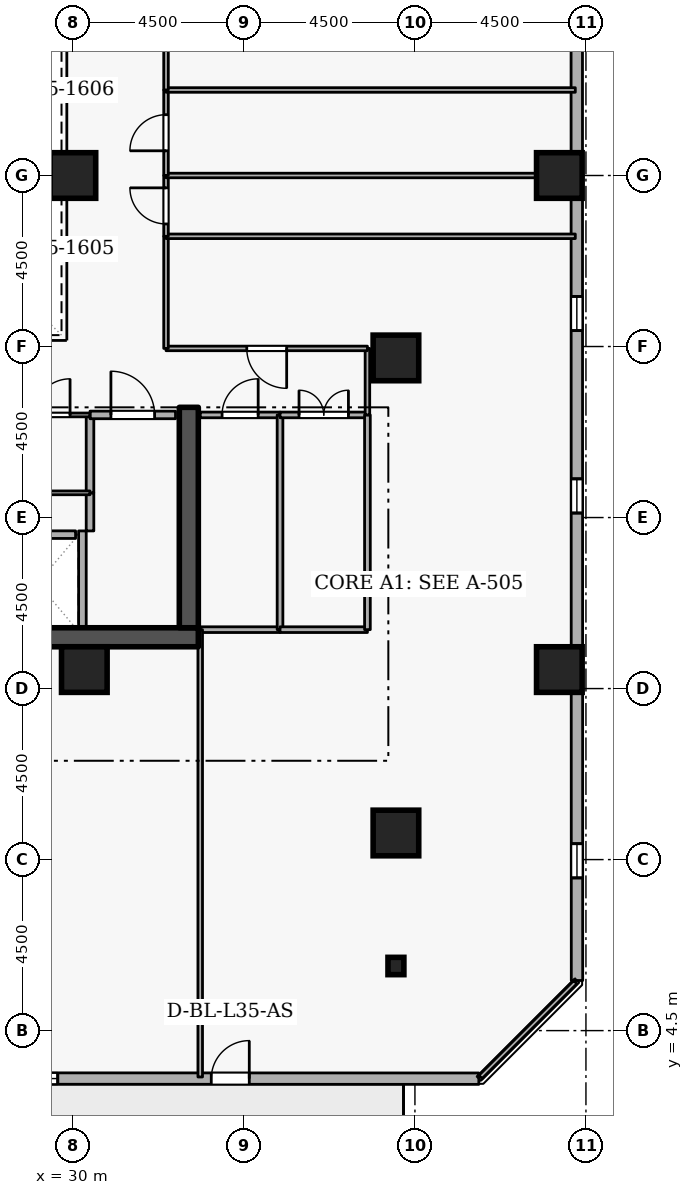
"""IFC4 building model, lengths in metres.
Left out: names, types, materials, properties, quantities, classifications, styles, units other than length and angle.
Written with IfcOpenShell. Run it as: python <this file> out.ifc"""

import sys

from ifc_helpers import new_model, si_unit, direction, frame, frame_2d, origin, origin_2d, place, context, subcontext, project, spatial, rectangle, i_section, extrude, element, fill, save


model = new_model("IFC4")
c1 = context("Model", 3, precision=1e-05, world=origin(), true_north=direction((0.0, 1.0)))
c2 = subcontext(c1, "Body", "Model", "MODEL_VIEW")
j1 = project(units=[si_unit("LENGTHUNIT", "METRE"), si_unit("PLANEANGLEUNIT", "RADIAN")], contexts=[c1])
p1 = place(None, origin())
s1 = spatial("IfcSite", under=j1, at=p1, CompositionType="ELEMENT")
p2 = place(p1, origin())
s2 = spatial("IfcBuilding", under=s1, at=p2, CompositionType="ELEMENT")
p3 = place(p2, frame((0.0, 0.0, 134.1)))
s3 = spatial("IfcBuildingStorey", under=s2, at=p3, CompositionType="ELEMENT", Elevation=134.1)
p4 = place(p3, frame((17.7, 14.85, 0.0), z_axis=(0.0, 0.0, 1.0), x_axis=(1.0, 0.0, 0.0)))
e1 = element("IfcWall", 1, at=p4, inside=s3, PredefinedType="SHEAR", context=c2, shape_type="SweptSolid", body=[
    extrude(rectangle(XDim=15.6, YDim=0.5, at=frame_2d((7.8, 0.0))), origin(), (0.0, 0.0, 1.0), 3.6),
])
p5 = place(p3, frame((33.05, 15.1, 0.0), z_axis=(0.0, 0.0, 1.0), x_axis=(0.0, 1.0, 0.0)))
e2 = element("IfcWall", 2, at=p5, inside=s3, PredefinedType="SHEAR", context=c2, shape_type="SweptSolid", body=[
    extrude(rectangle(XDim=5.8, YDim=0.5, at=frame_2d((2.9, 0.0))), origin(), (0.0, 0.0, 1.0), 3.6),
])
for number, where, z_axis, x_axis in (
    (3, (38.5, 9.7, 0.0), (0.0, 0.0, 1.0), (1.0, 0.0, 0.0)),
    (4, (42.8, 14.0, 0.0), (0.0, 0.0, 1.0), (1.0, 0.0, 0.0)),
    (5, (42.8, 27.0, 0.0), (0.0, 0.0, 1.0), (1.0, 0.0, 0.0)),
    (6, (38.5, 22.2, 0.0), (0.0, 0.0, 1.0), (1.0, 0.0, 0.0)),
    (7, (30.3, 14.0, 0.0), (0.0, 0.0, 1.0), (1.0, 0.0, 0.0)),
    (8, (30.0, 27.0, 0.0), (0.0, 0.0, 1.0), (1.0, 0.0, 0.0)),
):
    element("IfcColumn", number, at=place(p3, frame(where, z_axis=z_axis, x_axis=x_axis)), inside=s3, PredefinedType="COLUMN", context=c2, shape_type="SweptSolid", body=[
        extrude(rectangle(XDim=1.2, YDim=1.2, at=origin_2d()), origin(), (0.0, 0.0, 1.0), 3.6),
    ])
p6 = place(p3, frame((38.5, 6.2, 0.0), z_axis=(0.0, 0.0, 1.0), x_axis=(1.0, 0.0, 0.0)))
e9 = element("IfcColumn", 9, at=p6, inside=s3, PredefinedType="COLUMN", context=c2, shape_type="SweptSolid", body=[
    extrude(i_section(OverallWidth=0.418, OverallDepth=0.456, WebThickness=0.042, FlangeThickness=0.067, FilletRadius=0.015, at=origin_2d()), origin(), (0.0, 0.0, 1.0), 3.6),
])
p7 = place(p3, frame((6.801, 3.244, 0.0), z_axis=(0.0, 0.0, 1.0), x_axis=(0.999999969988, -0.000244999128, 0.0)))
e10 = element("IfcWall", 10, at=p7, inside=s3, PredefinedType="STANDARD", context=c2, shape_type="SweptSolid", body=[
    extrude(rectangle(XDim=33.881, YDim=0.3, at=frame_2d((16.94, 0.0))), origin(), (0.0, 0.0, 1.0), 2.7),
])
p8 = place(p7, frame((26.84, 0.0, 0.0)))
e11 = element("IfcOpeningElement", 11, at=p8, cuts=e10, PredefinedType="OPENING", context=c2, shape_type="SweptSolid", body=[
    extrude(rectangle(XDim=1.0, YDim=2.08, at=frame_2d((0.5, 1.04))), frame((0.0, 0.16, 0.0), z_axis=(0.0, -1.0, 0.0), x_axis=(1.0, 0.0, 0.0)), (0.0, 0.0, 1.0), 0.32),
])
p9 = place(p7, frame((2.7, 0.0, 0.72)))
e12 = element("IfcOpeningElement", 12, at=p9, cuts=e10, PredefinedType="OPENING", context=c2, shape_type="SweptSolid", body=[
    extrude(rectangle(XDim=0.9, YDim=1.75, at=frame_2d((0.45, 0.875))), frame((0.0, 0.16, 0.0), z_axis=(0.0, -1.0, 0.0), x_axis=(1.0, 0.0, 0.0)), (0.0, 0.0, 1.0), 0.32),
])
p10 = place(p7, frame((12.3, 0.0, 0.72)))
e13 = element("IfcOpeningElement", 13, at=p10, cuts=e10, PredefinedType="OPENING", context=c2, shape_type="SweptSolid", body=[
    extrude(rectangle(XDim=0.9, YDim=1.75, at=frame_2d((0.45, 0.875))), frame((0.0, 0.16, 0.0), z_axis=(0.0, -1.0, 0.0), x_axis=(1.0, 0.0, 0.0)), (0.0, 0.0, 1.0), 0.32),
])
p11 = place(p7, frame((17.1, 0.0, 0.72)))
e14 = element("IfcOpeningElement", 14, at=p11, cuts=e10, PredefinedType="OPENING", context=c2, shape_type="SweptSolid", body=[
    extrude(rectangle(XDim=0.9, YDim=1.75, at=frame_2d((0.45, 0.875))), frame((0.0, 0.16, 0.0), z_axis=(0.0, -1.0, 0.0), x_axis=(1.0, 0.0, 0.0)), (0.0, 0.0, 1.0), 0.32),
])
p12 = place(p7, frame((21.9, 0.0, 0.72)))
e15 = element("IfcOpeningElement", 15, at=p12, cuts=e10, PredefinedType="OPENING", context=c2, shape_type="SweptSolid", body=[
    extrude(rectangle(XDim=0.9, YDim=1.75, at=frame_2d((0.45, 0.875))), frame((0.0, 0.16, 0.0), z_axis=(0.0, -1.0, 0.0), x_axis=(1.0, 0.0, 0.0)), (0.0, 0.0, 1.0), 0.32),
])
p13 = place(p3, frame((43.265, 5.819, 0.0), z_axis=(0.0, 0.0, 1.0), x_axis=(-0.000244999128, 0.999999969988, 0.0)))
e16 = element("IfcWall", 16, at=p13, inside=s3, PredefinedType="STANDARD", context=c2, shape_type="SweptSolid", body=[
    extrude(rectangle(XDim=33.881, YDim=0.3, at=frame_2d((16.94, 0.0))), origin(), (0.0, 0.0, 1.0), 2.7),
])
p14 = place(p13, frame((2.7, 0.0, 0.72)))
e17 = element("IfcOpeningElement", 17, at=p14, cuts=e16, PredefinedType="OPENING", context=c2, shape_type="SweptSolid", body=[
    extrude(rectangle(XDim=0.9, YDim=1.75, at=frame_2d((0.45, 0.875))), frame((0.0, 0.16, 0.0), z_axis=(0.0, -1.0, 0.0), x_axis=(1.0, 0.0, 0.0)), (0.0, 0.0, 1.0), 0.32),
])
p15 = place(p13, frame((12.3, 0.0, 0.72)))
e18 = element("IfcOpeningElement", 18, at=p15, cuts=e16, PredefinedType="OPENING", context=c2, shape_type="SweptSolid", body=[
    extrude(rectangle(XDim=0.9, YDim=1.75, at=frame_2d((0.45, 0.875))), frame((0.0, 0.16, 0.0), z_axis=(0.0, -1.0, 0.0), x_axis=(1.0, 0.0, 0.0)), (0.0, 0.0, 1.0), 0.32),
])
p16 = place(p13, frame((17.1, 0.0, 0.72)))
e19 = element("IfcOpeningElement", 19, at=p16, cuts=e16, PredefinedType="OPENING", context=c2, shape_type="SweptSolid", body=[
    extrude(rectangle(XDim=0.9, YDim=1.75, at=frame_2d((0.45, 0.875))), frame((0.0, 0.16, 0.0), z_axis=(0.0, -1.0, 0.0), x_axis=(1.0, 0.0, 0.0)), (0.0, 0.0, 1.0), 0.32),
])
p17 = place(p13, frame((26.7, 0.0, 0.72)))
e20 = element("IfcOpeningElement", 20, at=p17, cuts=e16, PredefinedType="OPENING", context=c2, shape_type="SweptSolid", body=[
    extrude(rectangle(XDim=0.9, YDim=1.75, at=frame_2d((0.45, 0.875))), frame((0.0, 0.16, 0.0), z_axis=(0.0, -1.0, 0.0), x_axis=(1.0, 0.0, 0.0)), (0.0, 0.0, 1.0), 0.32),
])
p18 = place(p3, frame((28.08, 17.55, 0.0), z_axis=(0.0, 0.0, 1.0), x_axis=(1.0, 0.0, 0.0)))
e21 = element("IfcWall", 21, at=p18, inside=s3, PredefinedType="STANDARD", context=c2, shape_type="SweptSolid", body=[
    extrude(rectangle(XDim=1.99, YDim=0.2, at=frame_2d((0.995, 0.0))), origin(), (0.0, 0.0, 1.0), 3.34),
])
p19 = place(p3, frame((30.25, 15.112, 0.0), z_axis=(0.0, 0.0, 1.0), x_axis=(0.0, 1.0, 0.0)))
e22 = element("IfcWall", 22, at=p19, inside=s3, PredefinedType="STANDARD", context=c2, shape_type="SweptSolid", body=[
    extrude(rectangle(XDim=2.536, YDim=0.2, at=frame_2d((1.268, 0.0))), origin(), (0.0, 0.0, 1.0), 3.34),
])
p20 = place(p3, frame((30.45, 17.648, 0.0), z_axis=(0.0, 0.0, 1.0), x_axis=(0.0, 1.0, 0.0)))
e23 = element("IfcWall", 23, at=p20, inside=s3, PredefinedType="STANDARD", context=c2, shape_type="SweptSolid", body=[
    extrude(rectangle(XDim=1.002, YDim=0.2, at=frame_2d((0.501, 0.0))), origin(), (0.0, 0.0, 1.0), 3.34),
])
p21 = place(p3, frame((30.45, 18.65, 0.0), z_axis=(0.0, 0.0, 1.0), x_axis=(0.0, 1.0, 0.0)))
e24 = element("IfcWall", 24, at=p21, inside=s3, PredefinedType="STANDARD", context=c2, shape_type="SweptSolid", body=[
    extrude(rectangle(XDim=2.05, YDim=0.2, at=frame_2d((1.025, 0.0))), origin(), (0.0, 0.0, 1.0), 3.34),
])
p22 = place(p3, frame((30.45, 20.7, 0.0), z_axis=(0.0, 0.0, 1.0), x_axis=(1.0, 0.0, 0.0)))
e25 = element("IfcWall", 25, at=p22, inside=s3, PredefinedType="STANDARD", context=c2, shape_type="SweptSolid", body=[
    extrude(rectangle(XDim=2.25, YDim=0.2, at=frame_2d((1.125, 0.0))), origin(), (0.0, 0.0, 1.0), 3.34),
])
p23 = place(p22, frame((0.55, 0.0, 0.0)))
e26 = element("IfcOpeningElement", 26, at=p23, cuts=e25, PredefinedType="OPENING", context=c2, shape_type="SweptSolid", body=[
    extrude(rectangle(XDim=1.15, YDim=2.1, at=frame_2d((0.575, 1.05))), frame((0.0, 0.11, 0.0), z_axis=(0.0, -1.0, 0.0), x_axis=(1.0, 0.0, 0.0)), (0.0, 0.0, 1.0), 0.22),
])
p24 = place(p3, frame((30.45, 18.65, 0.0), z_axis=(0.0, 0.0, 1.0), x_axis=(-1.0, 0.0, 0.0)))
e27 = element("IfcWall", 27, at=p24, inside=s3, PredefinedType="PARTITIONING", context=c2, shape_type="SweptSolid", body=[
    extrude(rectangle(XDim=2.0, YDim=0.1, at=frame_2d((1.0, 0.0))), origin(), (0.0, 0.0, 1.0), 3.34),
])
p25 = place(p3, frame((28.45, 20.7, 0.0), z_axis=(0.0, 0.0, 1.0), x_axis=(1.0, 0.0, 0.0)))
e28 = element("IfcWall", 28, at=p25, inside=s3, PredefinedType="PARTITIONING", context=c2, shape_type="SweptSolid", body=[
    extrude(rectangle(XDim=2.0, YDim=0.1, at=frame_2d((1.0, 0.0))), origin(), (0.0, 0.0, 1.0), 3.34),
])
p26 = place(p25, frame((0.525, 0.0, 0.0)))
e29 = element("IfcOpeningElement", 29, at=p26, cuts=e28, PredefinedType="OPENING", context=c2, shape_type="SweptSolid", body=[
    extrude(rectangle(XDim=0.95, YDim=2.1, at=frame_2d((0.475, 1.05))), frame((0.0, 0.06, 0.0), z_axis=(0.0, -1.0, 0.0), x_axis=(1.0, 0.0, 0.0)), (0.0, 0.0, 1.0), 0.12),
])
p27 = place(p3, frame((35.45, 15.05, 0.0), z_axis=(0.0, 0.0, 1.0), x_axis=(-1.0, 0.0, 0.0)))
e30 = element("IfcWall", 30, at=p27, inside=s3, PredefinedType="PARTITIONING", context=c2, shape_type="SweptSolid", body=[
    extrude(rectangle(XDim=2.1, YDim=0.15, at=frame_2d((1.05, 0.0))), origin(), (0.0, 0.0, 1.0), 3.34),
])
p28 = place(p3, frame((33.35, 20.7, 0.0), z_axis=(0.0, 0.0, 1.0), x_axis=(1.0, 0.0, 0.0)))
e31 = element("IfcWall", 31, at=p28, inside=s3, PredefinedType="PARTITIONING", context=c2, shape_type="SweptSolid", body=[
    extrude(rectangle(XDim=2.1, YDim=0.15, at=frame_2d((1.05, 0.0))), origin(), (0.0, 0.0, 1.0), 3.34),
])
p29 = place(p28, frame((0.575, 0.0, 0.0)))
e32 = element("IfcOpeningElement", 32, at=p29, cuts=e31, PredefinedType="OPENING", context=c2, shape_type="SweptSolid", body=[
    extrude(rectangle(XDim=0.95, YDim=2.1, at=frame_2d((0.475, 1.05))), frame((0.0, 0.085, 0.0), z_axis=(0.0, -1.0, 0.0), x_axis=(1.0, 0.0, 0.0)), (0.0, 0.0, 1.0), 0.17),
])
p30 = place(p3, frame((35.45, 20.7, 0.0), z_axis=(0.0, 0.0, 1.0), x_axis=(0.0, -1.0, 0.0)))
e33 = element("IfcWall", 33, at=p30, inside=s3, PredefinedType="PARTITIONING", context=c2, shape_type="SweptSolid", body=[
    extrude(rectangle(XDim=5.65, YDim=0.15, at=frame_2d((2.825, 0.0))), origin(), (0.0, 0.0, 1.0), 3.34),
])
p31 = place(p3, frame((37.75, 15.05, 0.0), z_axis=(0.0, 0.0, 1.0), x_axis=(-1.0, 0.0, 0.0)))
e34 = element("IfcWall", 34, at=p31, inside=s3, PredefinedType="PARTITIONING", context=c2, shape_type="SweptSolid", body=[
    extrude(rectangle(XDim=2.3, YDim=0.15, at=frame_2d((1.15, 0.0))), origin(), (0.0, 0.0, 1.0), 3.34),
])
p32 = place(p3, frame((35.45, 20.7, 0.0), z_axis=(0.0, 0.0, 1.0), x_axis=(1.0, 0.0, 0.0)))
e35 = element("IfcWall", 35, at=p32, inside=s3, PredefinedType="PARTITIONING", context=c2, shape_type="SweptSolid", body=[
    extrude(rectangle(XDim=2.3, YDim=0.15, at=frame_2d((1.15, 0.0))), origin(), (0.0, 0.0, 1.0), 3.34),
])
p33 = place(p32, frame((0.5, 0.0, 0.0)))
e36 = element("IfcOpeningElement", 36, at=p33, cuts=e35, PredefinedType="OPENING", context=c2, shape_type="SweptSolid", body=[
    extrude(rectangle(XDim=1.3, YDim=2.12, at=frame_2d((0.65, 1.06))), frame((0.0, 0.085, 0.0), z_axis=(0.0, -1.0, 0.0), x_axis=(1.0, 0.0, 0.0)), (0.0, 0.0, 1.0), 0.17),
])
p34 = place(p3, frame((37.75, 20.7, 0.0), z_axis=(0.0, 0.0, 1.0), x_axis=(0.0, -1.0, 0.0)))
e37 = element("IfcWall", 37, at=p34, inside=s3, PredefinedType="PARTITIONING", context=c2, shape_type="SweptSolid", body=[
    extrude(rectangle(XDim=5.65, YDim=0.15, at=frame_2d((2.825, 0.0))), origin(), (0.0, 0.0, 1.0), 3.34),
])
p35 = place(p3, frame((33.35, 3.28, 0.0), z_axis=(0.0, 0.0, 1.0), x_axis=(0.0, 1.0, 0.0)))
e38 = element("IfcWall", 38, at=p35, inside=s3, PredefinedType="PARTITIONING", context=c2, shape_type="SweptSolid", body=[
    extrude(rectangle(XDim=11.77, YDim=0.12, at=frame_2d((5.885, 0.0))), origin(), (0.0, 0.0, 1.0), 2.545),
])
p36 = place(p3, frame((37.75, 20.7, 0.0), z_axis=(0.0, 0.0, 1.0), x_axis=(0.0, 1.0, 0.0)))
e39 = element("IfcWall", 39, at=p36, inside=s3, PredefinedType="PARTITIONING", context=c2, shape_type="SweptSolid", body=[
    extrude(rectangle(XDim=1.75, YDim=0.12, at=frame_2d((0.875, 0.0))), origin(), (0.0, 0.0, 1.0), 3.34),
])
p37 = place(p3, frame((37.75, 22.45, 0.0), z_axis=(0.0, 0.0, 1.0), x_axis=(-1.0, 0.0, 0.0)))
e40 = element("IfcWall", 40, at=p37, inside=s3, PredefinedType="PARTITIONING", context=c2, shape_type="SweptSolid", body=[
    extrude(rectangle(XDim=5.3, YDim=0.12, at=frame_2d((2.65, 0.0))), origin(), (0.0, 0.0, 1.0), 3.34),
])
p38 = place(p37, frame((2.125, 0.0, 0.0)))
e41 = element("IfcOpeningElement", 41, at=p38, cuts=e40, PredefinedType="OPENING", context=c2, shape_type="SweptSolid", body=[
    extrude(rectangle(XDim=1.05, YDim=2.1, at=frame_2d((0.525, 1.05))), frame((0.0, 0.07, 0.0), z_axis=(0.0, -1.0, 0.0), x_axis=(1.0, 0.0, 0.0)), (0.0, 0.0, 1.0), 0.14),
])
p39 = place(p3, frame((32.45, 22.45, 0.0), z_axis=(0.0, 0.0, 1.0), x_axis=(0.0, 1.0, 0.0)))
e42 = element("IfcWall", 42, at=p39, inside=s3, PredefinedType="PARTITIONING", context=c2, shape_type="SweptSolid", body=[
    extrude(rectangle(XDim=2.95, YDim=0.12, at=frame_2d((1.475, 0.0))), origin(), (0.0, 0.0, 1.0), 3.34),
])
p40 = place(p3, frame((32.45, 25.4, 0.0), z_axis=(0.0, 0.0, 1.0), x_axis=(1.0, 0.0, 0.0)))
e43 = element("IfcWall", 43, at=p40, inside=s3, PredefinedType="PARTITIONING", context=c2, shape_type="SweptSolid", body=[
    extrude(rectangle(XDim=10.77, YDim=0.12, at=frame_2d((5.385, 0.0))), origin(), (0.0, 0.0, 1.0), 3.34),
])
p41 = place(p3, frame((43.22, 5.775, 0.0), z_axis=(0.0, 0.0, 1.0), x_axis=(-0.707106781187, -0.707106781187, 0.0)))
e44 = element("IfcWall", 44, at=p41, inside=s3, PredefinedType="PARTITIONING", context=c2, shape_type="SweptSolid", body=[
    extrude(rectangle(XDim=3.528, YDim=0.12, at=frame_2d((1.764, 0.0))), origin(), (0.0, 0.0, 1.0), 3.34),
])
p42 = place(p3, frame((32.45, 25.4, 0.0), z_axis=(0.0, 0.0, 1.0), x_axis=(0.0, 1.0, 0.0)))
e45 = element("IfcWall", 45, at=p42, inside=s3, PredefinedType="PARTITIONING", context=c2, shape_type="SweptSolid", body=[
    extrude(rectangle(XDim=1.6, YDim=0.12, at=frame_2d((0.8, 0.0))), origin(), (0.0, 0.0, 1.0), 3.34),
])
p43 = place(p42, frame((0.325, 0.0, 0.0)))
e46 = element("IfcOpeningElement", 46, at=p43, cuts=e45, PredefinedType="OPENING", context=c2, shape_type="SweptSolid", body=[
    extrude(rectangle(XDim=0.95, YDim=2.1, at=frame_2d((0.475, 1.05))), frame((0.0, 0.07, 0.0), z_axis=(0.0, -1.0, 0.0), x_axis=(1.0, 0.0, 0.0)), (0.0, 0.0, 1.0), 0.14),
])
p44 = place(p3, frame((32.45, 27.0, 0.0), z_axis=(0.0, 0.0, 1.0), x_axis=(1.0, 0.0, 0.0)))
e47 = element("IfcWall", 47, at=p44, inside=s3, PredefinedType="PARTITIONING", context=c2, shape_type="SweptSolid", body=[
    extrude(rectangle(XDim=10.77, YDim=0.12, at=frame_2d((5.385, 0.0))), origin(), (0.0, 0.0, 1.0), 2.878),
])
p45 = place(p3, frame((32.45, 27.0, 0.0), z_axis=(0.0, 0.0, 1.0), x_axis=(0.0, 1.0, 0.0)))
e48 = element("IfcWall", 48, at=p45, inside=s3, PredefinedType="PARTITIONING", context=c2, shape_type="SweptSolid", body=[
    extrude(rectangle(XDim=2.25, YDim=0.12, at=frame_2d((1.125, 0.0))), origin(), (0.0, 0.0, 1.0), 3.34),
])
p46 = place(p45, frame((0.65, 0.0, 0.0)))
e49 = element("IfcOpeningElement", 49, at=p46, cuts=e48, PredefinedType="OPENING", context=c2, shape_type="SweptSolid", body=[
    extrude(rectangle(XDim=0.95, YDim=2.1, at=frame_2d((0.475, 1.05))), frame((0.0, 0.07, 0.0), z_axis=(0.0, -1.0, 0.0), x_axis=(1.0, 0.0, 0.0)), (0.0, 0.0, 1.0), 0.14),
])
p47 = place(p3, frame((32.45, 29.25, 0.0), z_axis=(0.0, 0.0, 1.0), x_axis=(1.0, 0.0, 0.0)))
e50 = element("IfcWall", 50, at=p47, inside=s3, PredefinedType="PARTITIONING", context=c2, shape_type="SweptSolid", body=[
    extrude(rectangle(XDim=10.77, YDim=0.12, at=frame_2d((5.385, 0.0))), origin(), (0.0, 0.0, 1.0), 3.34),
])
p48 = place(p3, frame((32.45, 29.25, 0.0), z_axis=(0.0, 0.0, 1.0), x_axis=(0.0, 1.0, 0.0)))
e51 = element("IfcWall", 51, at=p48, inside=s3, PredefinedType="PARTITIONING", context=c2, shape_type="SweptSolid", body=[
    extrude(rectangle(XDim=2.3, YDim=0.12, at=frame_2d((1.15, 0.0))), origin(), (0.0, 0.0, 1.0), 3.34),
])
p49 = place(p8, origin())
e52 = element("IfcDoor", 52, at=p49, inside=s3, OperationType="SINGLE_SWING_RIGHT", PredefinedType="DOOR", context=c2, shape_type="SweptSolid", body=[
    extrude(rectangle(XDim=1.0, YDim=2.08, at=frame_2d((0.5, 1.04))), frame((0.0, 0.025, 0.0), z_axis=(0.0, -1.0, 0.0), x_axis=(1.0, 0.0, 0.0)), (0.0, 0.0, 1.0), 0.05),
])
fill(e11, e52)
p50 = place(p12, origin())
e53 = element("IfcWindow", 53, at=p50, inside=s3, PartitioningType="SINGLE_PANEL", PredefinedType="WINDOW", context=c2, shape_type="SweptSolid", body=[
    extrude(rectangle(XDim=0.9, YDim=1.75, at=frame_2d((0.45, 0.875))), frame((0.0, 0.03, 0.0), z_axis=(0.0, -1.0, 0.0), x_axis=(1.0, 0.0, 0.0)), (0.0, 0.0, 1.0), 0.06),
])
fill(e15, e53)
p51 = place(p14, origin())
e54 = element("IfcWindow", 54, at=p51, inside=s3, PartitioningType="SINGLE_PANEL", PredefinedType="WINDOW", context=c2, shape_type="SweptSolid", body=[
    extrude(rectangle(XDim=0.9, YDim=1.75, at=frame_2d((0.45, 0.875))), frame((0.0, 0.03, 0.0), z_axis=(0.0, -1.0, 0.0), x_axis=(1.0, 0.0, 0.0)), (0.0, 0.0, 1.0), 0.06),
])
fill(e17, e54)
p52 = place(p15, origin())
e55 = element("IfcWindow", 55, at=p52, inside=s3, PartitioningType="SINGLE_PANEL", PredefinedType="WINDOW", context=c2, shape_type="SweptSolid", body=[
    extrude(rectangle(XDim=0.9, YDim=1.75, at=frame_2d((0.45, 0.875))), frame((0.0, 0.03, 0.0), z_axis=(0.0, -1.0, 0.0), x_axis=(1.0, 0.0, 0.0)), (0.0, 0.0, 1.0), 0.06),
])
fill(e18, e55)
p53 = place(p16, origin())
e56 = element("IfcWindow", 56, at=p53, inside=s3, PartitioningType="SINGLE_PANEL", PredefinedType="WINDOW", context=c2, shape_type="SweptSolid", body=[
    extrude(rectangle(XDim=0.9, YDim=1.75, at=frame_2d((0.45, 0.875))), frame((0.0, 0.03, 0.0), z_axis=(0.0, -1.0, 0.0), x_axis=(1.0, 0.0, 0.0)), (0.0, 0.0, 1.0), 0.06),
])
fill(e19, e56)
p54 = place(p26, origin())
e57 = element("IfcDoor", 57, at=p54, inside=s3, OperationType="SINGLE_SWING_RIGHT", PredefinedType="DOOR", context=c2, shape_type="SweptSolid", body=[
    extrude(rectangle(XDim=0.95, YDim=2.1, at=frame_2d((0.475, 1.05))), frame((0.0, 0.025, 0.0), z_axis=(0.0, -1.0, 0.0), x_axis=(1.0, 0.0, 0.0)), (0.0, 0.0, 1.0), 0.05),
])
fill(e29, e57)
p55 = place(p23, origin())
e58 = element("IfcDoor", 58, at=p55, inside=s3, OperationType="SINGLE_SWING_LEFT", PredefinedType="DOOR", context=c2, shape_type="SweptSolid", body=[
    extrude(rectangle(XDim=1.15, YDim=2.1, at=frame_2d((0.575, 1.05))), frame((0.0, 0.025, 0.0), z_axis=(0.0, -1.0, 0.0), x_axis=(1.0, 0.0, 0.0)), (0.0, 0.0, 1.0), 0.05),
])
fill(e26, e58)
p56 = place(p29, origin())
e59 = element("IfcDoor", 59, at=p56, inside=s3, OperationType="SINGLE_SWING_RIGHT", PredefinedType="DOOR", context=c2, shape_type="SweptSolid", body=[
    extrude(rectangle(XDim=0.95, YDim=2.1, at=frame_2d((0.475, 1.05))), frame((0.0, 0.025, 0.0), z_axis=(0.0, -1.0, 0.0), x_axis=(1.0, 0.0, 0.0)), (0.0, 0.0, 1.0), 0.05),
])
fill(e32, e59)
p57 = place(p33, origin())
e60 = element("IfcDoor", 60, at=p57, inside=s3, OperationType="DOUBLE_DOOR_SINGLE_SWING", PredefinedType="DOOR", context=c2, shape_type="SweptSolid", body=[
    extrude(rectangle(XDim=1.3, YDim=2.12, at=frame_2d((0.65, 1.06))), frame((0.0, 0.025, 0.0), z_axis=(0.0, -1.0, 0.0), x_axis=(1.0, 0.0, 0.0)), (0.0, 0.0, 1.0), 0.05),
])
fill(e36, e60)
p58 = place(p38, origin())
e61 = element("IfcDoor", 61, at=p58, inside=s3, OperationType="SINGLE_SWING_LEFT", PredefinedType="DOOR", context=c2, shape_type="SweptSolid", body=[
    extrude(rectangle(XDim=1.05, YDim=2.1, at=frame_2d((0.525, 1.05))), frame((0.0, 0.025, 0.0), z_axis=(0.0, -1.0, 0.0), x_axis=(1.0, 0.0, 0.0)), (0.0, 0.0, 1.0), 0.05),
])
fill(e41, e61)
p59 = place(p43, origin())
e62 = element("IfcDoor", 62, at=p59, inside=s3, OperationType="SINGLE_SWING_RIGHT", PredefinedType="DOOR", context=c2, shape_type="SweptSolid", body=[
    extrude(rectangle(XDim=0.95, YDim=2.1, at=frame_2d((0.475, 1.05))), frame((0.0, 0.025, 0.0), z_axis=(0.0, -1.0, 0.0), x_axis=(1.0, 0.0, 0.0)), (0.0, 0.0, 1.0), 0.05),
])
fill(e46, e62)
p60 = place(p46, origin())
e63 = element("IfcDoor", 63, at=p60, inside=s3, OperationType="SINGLE_SWING_LEFT", PredefinedType="DOOR", context=c2, shape_type="SweptSolid", body=[
    extrude(rectangle(XDim=0.95, YDim=2.1, at=frame_2d((0.475, 1.05))), frame((0.0, 0.025, 0.0), z_axis=(0.0, -1.0, 0.0), x_axis=(1.0, 0.0, 0.0)), (0.0, 0.0, 1.0), 0.05),
])
fill(e49, e63)
save(model, sys.argv[1])
